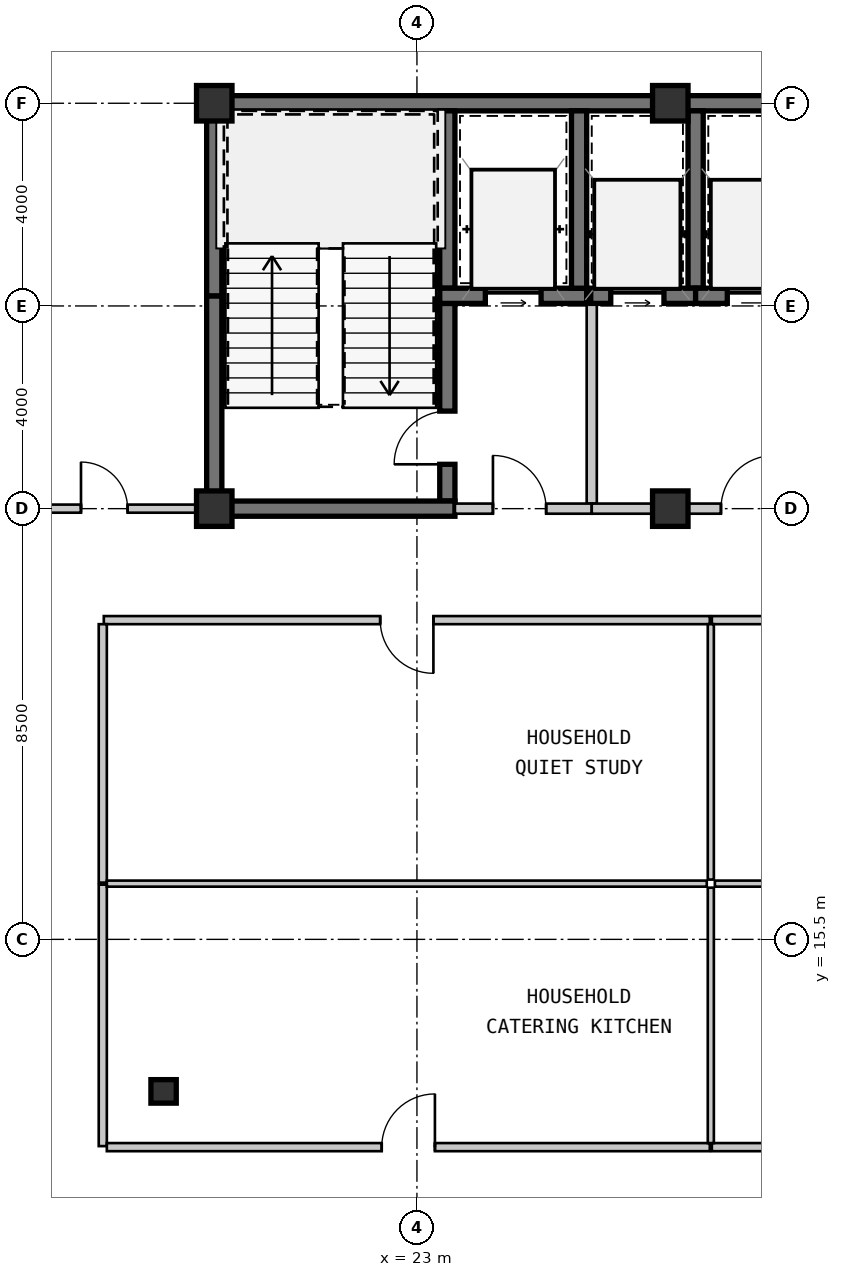
"""IFC4 building model, lengths in metres.
Left out: names, types, materials, properties, quantities, classifications, styles, units other than length and angle.
Written with IfcOpenShell. Run it as: python <this file> out.ifc"""

import sys

from ifc_helpers import new_model, si_unit, direction, frame, frame_2d, origin, origin_2d, place, context, subcontext, project, spatial, rectangle, i_section, extrude, source, transform, mapped, element, fill, save


model = new_model("IFC4")
c1 = context("Model", 3, precision=1e-05, world=origin(), true_north=direction((0.0, 1.0)))
c2 = subcontext(c1, "Body", "Model", "MODEL_VIEW")
j1 = project(units=[si_unit("LENGTHUNIT", "METRE"), si_unit("PLANEANGLEUNIT", "RADIAN")], contexts=[c1])
p1 = place(None, origin())
s1 = spatial("IfcSite", under=j1, at=p1, CompositionType="ELEMENT")
p2 = place(p1, origin())
s2 = spatial("IfcBuilding", under=s1, at=p2, CompositionType="ELEMENT")
p3 = place(p2, frame((0.0, 0.0, 99.75)))
s3 = spatial("IfcBuildingStorey", under=s2, at=p3, CompositionType="ELEMENT", Elevation=99.75)
m1 = source(origin(), c2, "Body", "SweptSolid", [
    extrude(rectangle(XDim=0.7, YDim=0.7, at=origin_2d()), origin(), (0.0, 0.0, 1.0), 3.15),
])
for number, where, z_axis, x_axis in (
    (1, (19.0, 24.0, 0.0), (0.0, 0.0, 1.0), (1.0, 0.0, 0.0)),
    (2, (28.0, 24.0, 0.0), (0.0, 0.0, 1.0), (1.0, 0.0, 0.0)),
    (3, (19.0, 32.0, 0.0), (0.0, 0.0, 1.0), (1.0, 0.0, 0.0)),
    (4, (28.0, 32.0, 0.0), (0.0, 0.0, 1.0), (1.0, 0.0, 0.0)),
):
    element("IfcColumn", number, at=place(p3, frame(where, z_axis=z_axis, x_axis=x_axis)), inside=s3, PredefinedType="COLUMN", context=c2, shape_type="MappedRepresentation", body=[
        mapped(m1, transform((0.0, 0.0, 0.0), scale=1.0)),
    ])
m2 = source(origin(), c2, "Body", "SweptSolid", [
    extrude(i_section(OverallWidth=0.5, OverallDepth=0.464, WebThickness=0.022, FlangeThickness=0.034, at=origin_2d()), origin(), (0.0, 0.0, 1.0), 3.15),
])
p4 = place(p3, frame((18.0, 12.5, 0.0), z_axis=(0.0, 0.0, 1.0), x_axis=(1.0, 0.0, 0.0)))
e5 = element("IfcColumn", 5, at=p4, inside=s3, PredefinedType="COLUMN", context=c2, shape_type="MappedRepresentation", body=[
    mapped(m2, transform((0.0, 0.0, 0.0), scale=1.0)),
])
m3 = source(origin(), c2, "Body", "SweptSolid", [
    extrude(rectangle(XDim=9.15, YDim=0.3, at=frame_2d((4.575, 0.0))), origin(), (0.0, 0.0, 1.0), 2.93),
])
p5 = place(p3, frame((18.85, 32.0, 0.0), z_axis=(0.0, 0.0, 1.0), x_axis=(1.0, 0.0, 0.0)))
e6 = element("IfcWall", 6, at=p5, inside=s3, PredefinedType="SHEAR", context=c2, shape_type="MappedRepresentation", body=[
    mapped(m3, transform((0.0, 0.0, 0.0), scale=1.0)),
])
m4 = source(origin(), c2, "Body", "SweptSolid", [
    extrude(rectangle(XDim=11.2, YDim=0.3, at=frame_2d((5.6, 0.0))), origin(), (0.0, 0.0, 1.0), 2.93),
])
p6 = place(p3, frame((28.0, 32.0, 0.0), z_axis=(0.0, 0.0, 1.0), x_axis=(1.0, 0.0, 0.0)))
e7 = element("IfcWall", 7, at=p6, inside=s3, PredefinedType="SHEAR", context=c2, shape_type="MappedRepresentation", body=[
    mapped(m4, transform((0.0, 0.0, 0.0), scale=1.0)),
])
m5 = source(origin(), c2, "Body", "SweptSolid", [
    extrude(rectangle(XDim=4.05, YDim=0.3, at=frame_2d((2.025, 0.0))), origin(), (0.0, 0.0, 1.0), 2.93),
])
p7 = place(p3, frame((19.0, 24.15, 0.0), z_axis=(0.0, 0.0, 1.0), x_axis=(0.0, 1.0, 0.0)))
e8 = element("IfcWall", 8, at=p7, inside=s3, PredefinedType="SHEAR", context=c2, shape_type="MappedRepresentation", body=[
    mapped(m5, transform((0.0, 0.0, 0.0), scale=1.0)),
])
m6 = source(origin(), c2, "Body", "SweptSolid", [
    extrude(rectangle(XDim=3.65, YDim=0.3, at=frame_2d((1.825, 0.0))), origin(), (0.0, 0.0, 1.0), 2.93),
])
p8 = place(p3, frame((19.0, 28.2, 0.0), z_axis=(0.0, 0.0, 1.0), x_axis=(0.0, 1.0, 0.0)))
e9 = element("IfcWall", 9, at=p8, inside=s3, PredefinedType="SHEAR", context=c2, shape_type="MappedRepresentation", body=[
    mapped(m6, transform((0.0, 0.0, 0.0), scale=1.0)),
])
m7 = source(origin(), c2, "Body", "SweptSolid", [
    extrude(rectangle(XDim=3.5, YDim=0.3, at=frame_2d((1.75, 0.0))), origin(), (0.0, 0.0, 1.0), 2.93),
])
p9 = place(p3, frame((23.6, 28.35, 0.0), z_axis=(0.0, 0.0, 1.0), x_axis=(0.0, 1.0, 0.0)))
e10 = element("IfcWall", 10, at=p9, inside=s3, PredefinedType="SHEAR", context=c2, shape_type="MappedRepresentation", body=[
    mapped(m7, transform((0.0, 0.0, 0.0), scale=1.0)),
])
m8 = source(origin(), c2, "Body", "SweptSolid", [
    extrude(rectangle(XDim=3.9, YDim=0.3, at=frame_2d((1.95, 0.0))), origin(), (0.0, 0.0, 1.0), 2.93),
])
p10 = place(p3, frame((23.6, 24.15, 0.0), z_axis=(0.0, 0.0, 1.0), x_axis=(0.0, 1.0, 0.0)))
e11 = element("IfcWall", 11, at=p10, inside=s3, PredefinedType="SHEAR", context=c2, shape_type="MappedRepresentation", body=[
    mapped(m8, transform((0.0, 0.0, 0.0), scale=1.0)),
])
m9 = source(origin(), c2, "Body", "SweptSolid", [
    extrude(rectangle(XDim=1.05, YDim=2.1, at=frame_2d((0.525, 1.05))), frame((0.0, 0.16, 0.0), z_axis=(0.0, -1.0, 0.0), x_axis=(1.0, 0.0, 0.0)), (0.0, 0.0, 1.0), 0.32),
])
p11 = place(p10, frame((0.725, 0.0, 0.0)))
e12 = element("IfcOpeningElement", 12, at=p11, cuts=e11, PredefinedType="OPENING", context=c2, shape_type="MappedRepresentation", body=[
    mapped(m9, transform((0.0, 0.0, 0.0), scale=1.0)),
])
m10 = source(origin(), c2, "Body", "SweptSolid", [
    extrude(rectangle(XDim=4.9, YDim=0.3, at=frame_2d((2.45, 0.0))), origin(), (0.0, 0.0, 1.0), 2.93),
])
p12 = place(p3, frame((18.85, 24.0, 0.0), z_axis=(0.0, 0.0, 1.0), x_axis=(1.0, 0.0, 0.0)))
e13 = element("IfcWall", 13, at=p12, inside=s3, PredefinedType="SHEAR", context=c2, shape_type="MappedRepresentation", body=[
    mapped(m10, transform((0.0, 0.0, 0.0), scale=1.0)),
])
m11 = source(origin(), c2, "Body", "SweptSolid", [
    extrude(rectangle(XDim=2.9, YDim=0.3, at=frame_2d((1.45, 0.0))), origin(), (0.0, 0.0, 1.0), 2.93),
])
p13 = place(p3, frame((23.45, 28.2, 0.0), z_axis=(0.0, 0.0, 1.0), x_axis=(1.0, 0.0, 0.0)))
e14 = element("IfcWall", 14, at=p13, inside=s3, PredefinedType="SHEAR", context=c2, shape_type="MappedRepresentation", body=[
    mapped(m11, transform((0.0, 0.0, 0.0), scale=1.0)),
])
m12 = source(origin(), c2, "Body", "SweptSolid", [
    extrude(rectangle(XDim=1.1, YDim=2.15, at=frame_2d((0.55, 1.075))), frame((0.0, 0.16, 0.0), z_axis=(0.0, -1.0, 0.0), x_axis=(1.0, 0.0, 0.0)), (0.0, 0.0, 1.0), 0.32),
])
p14 = place(p13, frame((0.9, 0.0, 0.0)))
e15 = element("IfcOpeningElement", 15, at=p14, cuts=e14, PredefinedType="OPENING", context=c2, shape_type="MappedRepresentation", body=[
    mapped(m12, transform((0.0, 0.0, 0.0), scale=1.0)),
])
p15 = place(p3, frame((26.2, 28.35, 0.0), z_axis=(0.0, 0.0, 1.0), x_axis=(0.0, 1.0, 0.0)))
e16 = element("IfcWall", 16, at=p15, inside=s3, PredefinedType="SHEAR", context=c2, shape_type="MappedRepresentation", body=[
    mapped(m7, transform((0.0, 0.0, 0.0), scale=1.0)),
])
m13 = source(origin(), c2, "Body", "SweptSolid", [
    extrude(rectangle(XDim=3.95, YDim=0.2, at=frame_2d((1.975, 0.0))), origin(), (0.0, 0.0, 1.0), 2.93),
])
p16 = place(p3, frame((26.45, 24.1, 0.0), z_axis=(0.0, 0.0, 1.0), x_axis=(0.0, 1.0, 0.0)))
e17 = element("IfcWall", 17, at=p16, inside=s3, PredefinedType="SOLIDWALL", context=c2, shape_type="MappedRepresentation", body=[
    mapped(m13, transform((0.0, 0.0, 0.0), scale=1.0)),
])
m14 = source(origin(), c2, "Body", "SweptSolid", [
    extrude(rectangle(XDim=2.7, YDim=0.2, at=frame_2d((1.35, 0.0))), origin(), (0.0, 0.0, 1.0), 2.47),
])
p17 = place(p3, frame((23.75, 24.0, 0.0), z_axis=(0.0, 0.0, 1.0), x_axis=(1.0, 0.0, 0.0)))
e18 = element("IfcWall", 18, at=p17, inside=s3, PredefinedType="SOLIDWALL", context=c2, shape_type="MappedRepresentation", body=[
    mapped(m14, transform((0.0, 0.0, 0.0), scale=1.0)),
])
m15 = source(origin(), c2, "Body", "SweptSolid", [
    extrude(rectangle(XDim=1.05, YDim=2.1, at=frame_2d((0.525, 1.05))), frame((0.0, 0.11, 0.0), z_axis=(0.0, -1.0, 0.0), x_axis=(1.0, 0.0, 0.0)), (0.0, 0.0, 1.0), 0.22),
])
p18 = place(p17, frame((0.75, 0.0, 0.0)))
e19 = element("IfcOpeningElement", 19, at=p18, cuts=e18, PredefinedType="OPENING", context=c2, shape_type="MappedRepresentation", body=[
    mapped(m15, transform((0.0, 0.0, 0.0), scale=1.0)),
])
p19 = place(p3, frame((28.5, 28.35, 0.0), z_axis=(0.0, 0.0, 1.0), x_axis=(0.0, 1.0, 0.0)))
e20 = element("IfcWall", 20, at=p19, inside=s3, PredefinedType="SHEAR", context=c2, shape_type="MappedRepresentation", body=[
    mapped(m7, transform((0.0, 0.0, 0.0), scale=1.0)),
])
m16 = source(origin(), c2, "Body", "SweptSolid", [
    extrude(rectangle(XDim=2.07, YDim=0.3, at=frame_2d((1.035, 0.0))), origin(), (0.0, 0.0, 1.0), 2.93),
])
p20 = place(p3, frame((26.43, 28.2, 0.0), z_axis=(0.0, 0.0, 1.0), x_axis=(1.0, 0.0, 0.0)))
e21 = element("IfcWall", 21, at=p20, inside=s3, PredefinedType="SHEAR", context=c2, shape_type="MappedRepresentation", body=[
    mapped(m16, transform((0.0, 0.0, 0.0), scale=1.0)),
])
m17 = source(origin(), c2, "Body", "SweptSolid", [
    extrude(rectangle(XDim=1.05, YDim=2.15, at=frame_2d((0.525, 1.075))), frame((0.0, 0.16, 0.0), z_axis=(0.0, -1.0, 0.0), x_axis=(1.0, 0.0, 0.0)), (0.0, 0.0, 1.0), 0.32),
])
p21 = place(p20, frame((0.395, 0.0, 0.0)))
e22 = element("IfcOpeningElement", 22, at=p21, cuts=e21, PredefinedType="OPENING", context=c2, shape_type="MappedRepresentation", body=[
    mapped(m17, transform((0.0, 0.0, 0.0), scale=1.0)),
])
m18 = source(origin(), c2, "Body", "SweptSolid", [
    extrude(rectangle(XDim=2.45, YDim=0.3, at=frame_2d((1.225, 0.0))), origin(), (0.0, 0.0, 1.0), 2.93),
])
p22 = place(p3, frame((28.5, 28.2, 0.0), z_axis=(0.0, 0.0, 1.0), x_axis=(1.0, 0.0, 0.0)))
e23 = element("IfcWall", 23, at=p22, inside=s3, PredefinedType="SHEAR", context=c2, shape_type="MappedRepresentation", body=[
    mapped(m18, transform((0.0, 0.0, 0.0), scale=1.0)),
])
p23 = place(p22, frame((0.625, 0.0, 0.0)))
e24 = element("IfcOpeningElement", 24, at=p23, cuts=e23, PredefinedType="OPENING", context=c2, shape_type="MappedRepresentation", body=[
    mapped(m17, transform((0.0, 0.0, 0.0), scale=1.0)),
])
m19 = source(origin(), c2, "Body", "SweptSolid", [
    extrude(rectangle(XDim=4.35, YDim=0.2, at=frame_2d((2.175, 0.0))), origin(), (0.0, 0.0, 1.0), 2.47),
])
p24 = place(p3, frame((30.8, 24.0, 0.0), z_axis=(0.0, 0.0, 1.0), x_axis=(-1.0, 0.0, 0.0)))
e25 = element("IfcWall", 25, at=p24, inside=s3, PredefinedType="SOLIDWALL", context=c2, shape_type="MappedRepresentation", body=[
    mapped(m19, transform((0.0, 0.0, 0.0), scale=1.0)),
])
p25 = place(p24, frame((0.75, 0.0, 0.0)))
e26 = element("IfcOpeningElement", 26, at=p25, cuts=e25, PredefinedType="OPENING", context=c2, shape_type="MappedRepresentation", body=[
    mapped(m15, transform((0.0, 0.0, 0.0), scale=1.0)),
])
m20 = source(origin(), c2, "Body", "SweptSolid", [
    extrude(rectangle(XDim=5.16, YDim=0.16, at=frame_2d((2.58, 0.0))), origin(), (0.0, 0.0, 1.0), 2.93),
])
p26 = place(p3, frame((16.8, 16.58, 0.0), z_axis=(0.0, 0.0, 1.0), x_axis=(0.0, -1.0, 0.0)))
e27 = element("IfcWall", 27, at=p26, inside=s3, PredefinedType="PARTITIONING", context=c2, shape_type="MappedRepresentation", body=[
    mapped(m20, transform((0.0, 0.0, 0.0), scale=1.0)),
])
m21 = source(origin(), c2, "Body", "SweptSolid", [
    extrude(rectangle(XDim=11.959, YDim=0.16, at=frame_2d((5.98, 0.0))), origin(), (0.0, 0.0, 1.0), 2.93),
])
p27 = place(p3, frame((28.78, 21.8, 0.0), z_axis=(0.0, 0.0, 1.0), x_axis=(-1.0, 0.0, 0.0)))
e28 = element("IfcWall", 28, at=p27, inside=s3, PredefinedType="PARTITIONING", context=c2, shape_type="MappedRepresentation", body=[
    mapped(m21, transform((0.0, 0.0, 0.0), scale=1.0)),
])
m22 = source(origin(), c2, "Body", "SweptSolid", [
    extrude(rectangle(XDim=1.05, YDim=2.1, at=frame_2d((0.525, 1.05))), frame((0.0, 0.09, 0.0), z_axis=(0.0, -1.0, 0.0), x_axis=(1.0, 0.0, 0.0)), (0.0, 0.0, 1.0), 0.18),
])
p28 = place(p27, frame((5.455, 0.0, 0.0)))
e29 = element("IfcOpeningElement", 29, at=p28, cuts=e28, PredefinedType="OPENING", context=c2, shape_type="MappedRepresentation", body=[
    mapped(m22, transform((0.0, 0.0, 0.0), scale=1.0)),
])
m23 = source(origin(), c2, "Body", "SweptSolid", [
    extrude(rectangle(XDim=5.1, YDim=0.16, at=frame_2d((2.55, 0.0))), origin(), (0.0, 0.0, 1.0), 2.93),
])
p29 = place(p3, frame((16.8, 21.72, 0.0), z_axis=(0.0, 0.0, 1.0), x_axis=(0.0, -1.0, 0.0)))
e30 = element("IfcWall", 30, at=p29, inside=s3, PredefinedType="PARTITIONING", context=c2, shape_type="MappedRepresentation", body=[
    mapped(m23, transform((0.0, 0.0, 0.0), scale=1.0)),
])
m24 = source(origin(), c2, "Body", "SweptSolid", [
    extrude(rectangle(XDim=12.159, YDim=0.16, at=frame_2d((6.08, 0.0))), origin(), (0.0, 0.0, 1.0), 2.93),
])
p30 = place(p3, frame((40.98, 21.8, 0.0), z_axis=(0.0, 0.0, 1.0), x_axis=(-1.0, 0.0, 0.0)))
e31 = element("IfcWall", 31, at=p30, inside=s3, PredefinedType="PARTITIONING", context=c2, shape_type="MappedRepresentation", body=[
    mapped(m24, transform((0.0, 0.0, 0.0), scale=1.0)),
])
p31 = place(p30, frame((5.555, 0.0, 0.0)))
e32 = element("IfcOpeningElement", 32, at=p31, cuts=e31, PredefinedType="OPENING", context=c2, shape_type="MappedRepresentation", body=[
    mapped(m22, transform((0.0, 0.0, 0.0), scale=1.0)),
])
m25 = source(origin(), c2, "Body", "SweptSolid", [
    extrude(rectangle(XDim=4.17, YDim=0.16, at=frame_2d((2.085, 0.0))), origin(), (0.0, 0.0, 1.0), 2.93),
])
p32 = place(p3, frame((14.68, 24.0, 0.0), z_axis=(0.0, 0.0, 1.0), x_axis=(1.0, 0.0, 0.0)))
e33 = element("IfcWall", 33, at=p32, inside=s3, PredefinedType="PARTITIONING", context=c2, shape_type="MappedRepresentation", body=[
    mapped(m25, transform((0.0, 0.0, 0.0), scale=1.0)),
])
m26 = source(origin(), c2, "Body", "SweptSolid", [
    extrude(rectangle(XDim=0.92, YDim=2.1, at=frame_2d((0.46, 1.05))), frame((0.0, 0.09, 0.0), z_axis=(0.0, -1.0, 0.0), x_axis=(1.0, 0.0, 0.0)), (0.0, 0.0, 1.0), 0.18),
])
p33 = place(p32, frame((1.69, 0.0, 0.0)))
e34 = element("IfcOpeningElement", 34, at=p33, cuts=e33, PredefinedType="OPENING", context=c2, shape_type="MappedRepresentation", body=[
    mapped(m26, transform((0.0, 0.0, 0.0), scale=1.0)),
])
m27 = source(origin(), c2, "Body", "SweptSolid", [
    extrude(rectangle(XDim=11.9, YDim=0.16, at=frame_2d((5.95, 0.0))), origin(), (0.0, 0.0, 1.0), 2.93),
])
p34 = place(p3, frame((16.88, 11.4, 0.0), z_axis=(0.0, 0.0, 1.0), x_axis=(1.0, 0.0, 0.0)))
e35 = element("IfcWall", 35, at=p34, inside=s3, PredefinedType="PARTITIONING", context=c2, shape_type="MappedRepresentation", body=[
    mapped(m27, transform((0.0, 0.0, 0.0), scale=1.0)),
])
p35 = place(p34, frame((5.425, 0.0, 0.0)))
e36 = element("IfcOpeningElement", 36, at=p35, cuts=e35, PredefinedType="OPENING", context=c2, shape_type="MappedRepresentation", body=[
    mapped(m22, transform((0.0, 0.0, 0.0), scale=1.0)),
])
p36 = place(p3, frame((28.82, 11.4, 0.0), z_axis=(0.0, 0.0, 1.0), x_axis=(1.0, 0.0, 0.0)))
e37 = element("IfcWall", 37, at=p36, inside=s3, PredefinedType="PARTITIONING", context=c2, shape_type="MappedRepresentation", body=[
    mapped(m24, transform((0.0, 0.0, 0.0), scale=1.0)),
])
p37 = place(p36, frame((5.555, 0.0, 0.0)))
e38 = element("IfcOpeningElement", 38, at=p37, cuts=e37, PredefinedType="OPENING", context=c2, shape_type="MappedRepresentation", body=[
    mapped(m22, transform((0.0, 0.0, 0.0), scale=1.0)),
])
m28 = source(origin(), c2, "Body", "SweptSolid", [
    extrude(rectangle(XDim=11.84, YDim=0.12, at=frame_2d((5.92, 0.0))), origin(), (0.0, 0.0, 1.0), 2.93),
])
p38 = place(p3, frame((16.88, 16.6, 0.0), z_axis=(0.0, 0.0, 1.0), x_axis=(1.0, 0.0, 0.0)))
e39 = element("IfcWall", 39, at=p38, inside=s3, PredefinedType="PARTITIONING", context=c2, shape_type="MappedRepresentation", body=[
    mapped(m28, transform((0.0, 0.0, 0.0), scale=1.0)),
])
m29 = source(origin(), c2, "Body", "SweptSolid", [
    extrude(rectangle(XDim=5.04, YDim=0.12, at=frame_2d((2.52, 0.0))), origin(), (0.0, 0.0, 1.0), 2.93),
])
for number, where, z_axis, x_axis in (
    (40, (28.8, 16.52, 0.0), (0.0, 0.0, 1.0), (0.0, -1.0, 0.0)),
    (41, (28.8, 21.72, 0.0), (0.0, 0.0, 1.0), (0.0, -1.0, 0.0)),
):
    element("IfcWall", number, at=place(p3, frame(where, z_axis=z_axis, x_axis=x_axis)), inside=s3, PredefinedType="PARTITIONING", context=c2, shape_type="MappedRepresentation", body=[
        mapped(m29, transform((0.0, 0.0, 0.0), scale=1.0)),
    ])
m30 = source(origin(), c2, "Body", "SweptSolid", [
    extrude(rectangle(XDim=12.04, YDim=0.12, at=frame_2d((6.02, 0.0))), origin(), (0.0, 0.0, 1.0), 2.93),
])
p39 = place(p3, frame((28.88, 16.6, 0.0), z_axis=(0.0, 0.0, 1.0), x_axis=(1.0, 0.0, 0.0)))
e42 = element("IfcWall", 42, at=p39, inside=s3, PredefinedType="PARTITIONING", context=c2, shape_type="MappedRepresentation", body=[
    mapped(m30, transform((0.0, 0.0, 0.0), scale=1.0)),
])
m31 = source(origin(), c2, "Body", "SweptSolid", [
    extrude(rectangle(XDim=1.05, YDim=2.1, at=frame_2d((0.525, 1.05))), frame((0.0, 0.025, 0.0), z_axis=(0.0, -1.0, 0.0), x_axis=(1.0, 0.0, 0.0)), (0.0, 0.0, 1.0), 0.05),
])
p40 = place(p11, origin())
e43 = element("IfcDoor", 43, at=p40, inside=s3, OperationType="SINGLE_SWING_LEFT", PredefinedType="DOOR", context=c2, shape_type="MappedRepresentation", body=[
    mapped(m31, transform((0.0, 0.0, 0.0), scale=1.0)),
])
fill(e12, e43)
m32 = source(origin(), c2, "Body", "SweptSolid", [
    extrude(rectangle(XDim=1.1, YDim=2.15, at=frame_2d((0.55, 1.075))), frame((0.0, 0.025, 0.0), z_axis=(0.0, -1.0, 0.0), x_axis=(1.0, 0.0, 0.0)), (0.0, 0.0, 1.0), 0.05),
])
p41 = place(p14, origin())
e44 = element("IfcDoor", 44, at=p41, inside=s3, OperationType="SLIDING_TO_LEFT", PredefinedType="DOOR", context=c2, shape_type="MappedRepresentation", body=[
    mapped(m32, transform((0.0, 0.0, 0.0), scale=1.0)),
])
fill(e15, e44)
p42 = place(p18, origin())
e45 = element("IfcDoor", 45, at=p42, inside=s3, OperationType="SINGLE_SWING_LEFT", PredefinedType="DOOR", context=c2, shape_type="MappedRepresentation", body=[
    mapped(m31, transform((0.0, 0.0, 0.0), scale=1.0)),
])
fill(e19, e45)
m33 = source(origin(), c2, "Body", "SweptSolid", [
    extrude(rectangle(XDim=1.05, YDim=2.15, at=frame_2d((0.525, 1.075))), frame((0.0, 0.025, 0.0), z_axis=(0.0, -1.0, 0.0), x_axis=(1.0, 0.0, 0.0)), (0.0, 0.0, 1.0), 0.05),
])
p43 = place(p21, origin())
e46 = element("IfcDoor", 46, at=p43, inside=s3, OperationType="SLIDING_TO_LEFT", PredefinedType="DOOR", context=c2, shape_type="MappedRepresentation", body=[
    mapped(m33, transform((0.0, 0.0, 0.0), scale=1.0)),
])
fill(e22, e46)
p44 = place(p23, origin())
e47 = element("IfcDoor", 47, at=p44, inside=s3, OperationType="SLIDING_TO_LEFT", PredefinedType="DOOR", context=c2, shape_type="MappedRepresentation", body=[
    mapped(m33, transform((0.0, 0.0, 0.0), scale=1.0)),
])
fill(e24, e47)
p45 = place(p25, frame((1.05, 0.0, 0.0), z_axis=(0.0, 0.0, 1.0), x_axis=(-1.0, 0.0, 0.0)))
e48 = element("IfcDoor", 48, at=p45, inside=s3, OperationType="SINGLE_SWING_RIGHT", PredefinedType="DOOR", context=c2, shape_type="MappedRepresentation", body=[
    mapped(m31, transform((0.0, 0.0, 0.0), scale=1.0)),
])
fill(e26, e48)
p46 = place(p28, origin())
e49 = element("IfcDoor", 49, at=p46, inside=s3, OperationType="SINGLE_SWING_LEFT", PredefinedType="DOOR", context=c2, shape_type="MappedRepresentation", body=[
    mapped(m31, transform((0.0, 0.0, 0.0), scale=1.0)),
])
fill(e29, e49)
m34 = source(origin(), c2, "Body", "SweptSolid", [
    extrude(rectangle(XDim=0.92, YDim=2.1, at=frame_2d((0.46, 1.05))), frame((0.0, 0.025, 0.0), z_axis=(0.0, -1.0, 0.0), x_axis=(1.0, 0.0, 0.0)), (0.0, 0.0, 1.0), 0.05),
])
p47 = place(p33, origin())
e50 = element("IfcDoor", 50, at=p47, inside=s3, OperationType="SINGLE_SWING_LEFT", PredefinedType="DOOR", context=c2, shape_type="MappedRepresentation", body=[
    mapped(m34, transform((0.0, 0.0, 0.0), scale=1.0)),
])
fill(e34, e50)
p48 = place(p35, origin())
e51 = element("IfcDoor", 51, at=p48, inside=s3, OperationType="SINGLE_SWING_RIGHT", PredefinedType="DOOR", context=c2, shape_type="MappedRepresentation", body=[
    mapped(m31, transform((0.0, 0.0, 0.0), scale=1.0)),
])
fill(e36, e51)
save(model, sys.argv[1])
